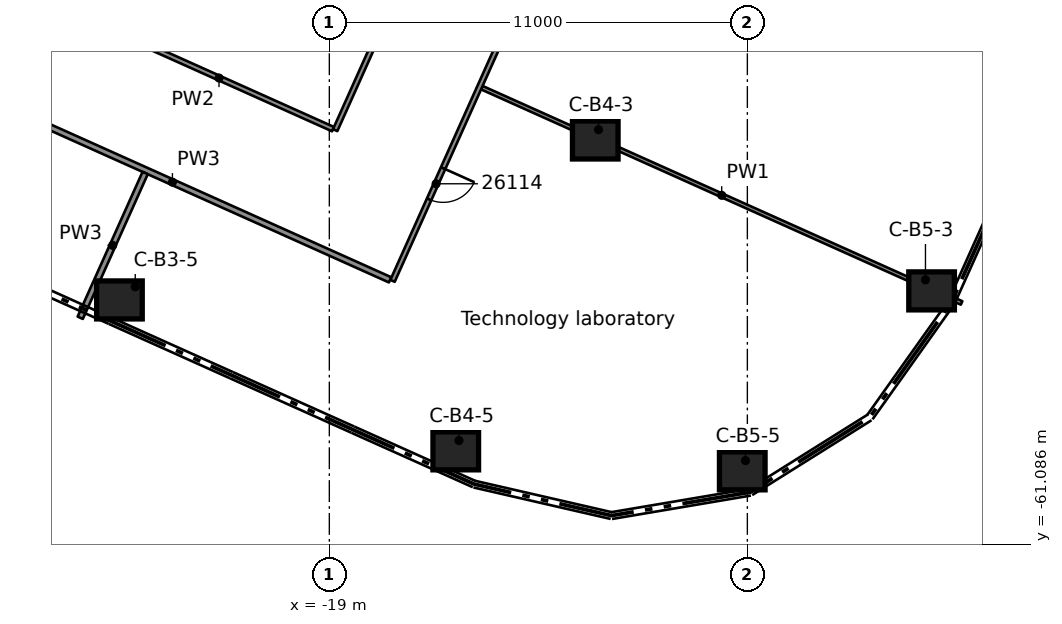
"""IFC4 building model, lengths in metres.
Left out: names, types, materials, properties, quantities, classifications, styles, units other than length and angle.
Written with IfcOpenShell. Run it as: python <this file> out.ifc"""

import sys

from ifc_helpers import new_model, si_unit, direction, frame, frame_2d, origin, origin_2d, place, context, subcontext, project, spatial, rectangle, extrude, element, fill, save


model = new_model("IFC4")
c1 = context("Model", 3, precision=1e-05, world=origin(), true_north=direction((0.0, 1.0)))
c2 = subcontext(c1, "Body", "Model", "MODEL_VIEW")
j1 = project(units=[si_unit("LENGTHUNIT", "METRE"), si_unit("PLANEANGLEUNIT", "RADIAN")], contexts=[c1])
p1 = place(None, origin())
s1 = spatial("IfcSite", under=j1, at=p1, CompositionType="ELEMENT")
p2 = place(p1, origin())
s2 = spatial("IfcBuilding", under=s1, at=p2, CompositionType="ELEMENT")
p3 = place(p2, frame((0.0, 0.0, 134.2)))
s3 = spatial("IfcBuildingStorey", under=s2, at=p3, CompositionType="ELEMENT", Elevation=134.2)
for number, where, z_axis, x_axis in (
    (1, (-24.523, -54.65, 0.0), (0.0, 0.0, 1.0), (1.0, 0.0, 0.0)),
    (2, (-12.002, -50.441, 0.0), (0.0, 0.0, 1.0), (1.0, 0.0, 0.0)),
    (3, (-15.673, -58.621, 0.0), (0.0, 0.0, 1.0), (1.0, 0.0, 0.0)),
    (4, (-3.152, -54.412, 0.0), (0.0, 0.0, 1.0), (1.0, 0.0, 0.0)),
    (5, (-8.134, -59.147, 0.0), (0.0, 0.0, 1.0), (1.0, 0.0, 0.0)),
):
    element("IfcColumn", number, at=place(p3, frame(where, z_axis=z_axis, x_axis=x_axis)), inside=s3, PredefinedType="COLUMN", context=c2, shape_type="SweptSolid", body=[
        extrude(rectangle(XDim=1.2, YDim=1.0, at=origin_2d()), origin(), (0.0, 0.0, 1.0), 3.5),
    ])
p4 = place(p3, frame((-17.401, -54.121, 0.0), z_axis=(0.0, 0.0, 1.0), x_axis=(-0.912370625887, 0.409365168302, 0.0)))
e6 = element("IfcWall", 6, at=p4, inside=s3, PredefinedType="PARTITIONING", context=c2, shape_type="SweptSolid", body=[
    extrude(rectangle(XDim=12.556, YDim=0.15, at=frame_2d((6.278, 0.0))), origin(), (0.0, 0.0, 1.0), 3.03),
])
p5 = place(p3, frame((-24.903, -47.465, 0.0), z_axis=(0.0, 0.0, 1.0), x_axis=(0.912437629311, -0.409215802013, 0.0)))
e7 = element("IfcWall", 7, at=p5, inside=s3, PredefinedType="PARTITIONING", context=c2, shape_type="SweptSolid", body=[
    extrude(rectangle(XDim=6.576, YDim=0.125, at=frame_2d((3.288, 0.0))), origin(), (0.0, 0.0, 1.0), 3.03),
])
p6 = place(p3, frame((-14.987, -49.065, 0.0), z_axis=(0.0, 0.0, 1.0), x_axis=(0.912373916734, -0.409357833763, 0.0)))
e8 = element("IfcWall", 8, at=p6, inside=s3, PredefinedType="PARTITIONING", context=c2, shape_type="SweptSolid", body=[
    extrude(rectangle(XDim=13.836, YDim=0.1, at=frame_2d((6.918, 0.0))), origin(), (0.0, 0.0, 1.0), 3.03),
])
p7 = place(p3, frame((-7.052, -31.233, 0.0), z_axis=(0.0, 0.0, 1.0), x_axis=(-0.409475332718, -0.912321188998, 0.0)))
e9 = element("IfcWall", 9, at=p7, inside=s3, PredefinedType="PARTITIONING", context=c2, shape_type="SweptSolid", body=[
    extrude(rectangle(XDim=25.117, YDim=0.125, at=frame_2d((12.559, 0.0))), origin(), (0.0, 0.0, 1.0), 3.03),
])
p8 = place(p7, frame((4.91, 0.0, 0.0)))
e10 = element("IfcOpeningElement", 10, at=p8, cuts=e9, PredefinedType="OPENING", context=c2, shape_type="SweptSolid", body=[
    extrude(rectangle(XDim=0.9, YDim=2.1, at=frame_2d((0.45, 1.05))), frame((0.0, 0.073, 0.0), z_axis=(0.0, -1.0, 0.0), x_axis=(1.0, 0.0, 0.0)), (0.0, 0.0, 1.0), 0.145),
])
p9 = place(p7, frame((14.217, 0.0, 0.0)))
e11 = element("IfcOpeningElement", 11, at=p9, cuts=e9, PredefinedType="OPENING", context=c2, shape_type="SweptSolid", body=[
    extrude(rectangle(XDim=1.8, YDim=2.1, at=frame_2d((0.9, 1.05))), frame((0.0, 0.073, 0.0), z_axis=(0.0, -1.0, 0.0), x_axis=(1.0, 0.0, 0.0)), (0.0, 0.0, 1.0), 0.145),
])
p10 = place(p7, frame((21.867, 0.0, 0.0)))
e12 = element("IfcOpeningElement", 12, at=p10, cuts=e9, PredefinedType="OPENING", context=c2, shape_type="SweptSolid", body=[
    extrude(rectangle(XDim=0.9, YDim=2.1, at=frame_2d((0.45, 1.05))), frame((0.0, 0.073, 0.0), z_axis=(0.0, -1.0, 0.0), x_axis=(1.0, 0.0, 0.0)), (0.0, 0.0, 1.0), 0.145),
])
p11 = place(p3, frame((-18.846, -50.182, 0.0), z_axis=(0.0, 0.0, 1.0), x_axis=(0.409280065355, 0.912408805363, 0.0)))
e13 = element("IfcWall", 13, at=p11, inside=s3, PredefinedType="PARTITIONING", context=c2, shape_type="SweptSolid", body=[
    extrude(rectangle(XDim=21.42, YDim=0.125, at=frame_2d((10.71, 0.0))), origin(), (0.0, 0.0, 1.0), 3.03),
])
p12 = place(p11, frame((16.1, 0.0, 0.0)))
e14 = element("IfcOpeningElement", 14, at=p12, cuts=e13, PredefinedType="OPENING", context=c2, shape_type="SweptSolid", body=[
    extrude(rectangle(XDim=0.9, YDim=2.1, at=frame_2d((0.45, 1.05))), frame((0.0, 0.073, 0.0), z_axis=(0.0, -1.0, 0.0), x_axis=(1.0, 0.0, 0.0)), (0.0, 0.0, 1.0), 0.145),
])
p13 = place(p11, frame((6.7, 0.0, 0.0)))
e15 = element("IfcOpeningElement", 15, at=p13, cuts=e13, PredefinedType="OPENING", context=c2, shape_type="SweptSolid", body=[
    extrude(rectangle(XDim=0.9, YDim=2.1, at=frame_2d((0.45, 1.05))), frame((0.0, 0.073, 0.0), z_axis=(0.0, -1.0, 0.0), x_axis=(1.0, 0.0, 0.0)), (0.0, 0.0, 1.0), 0.145),
])
p14 = place(p3, frame((-25.555, -55.119, 0.0), z_axis=(0.0, 0.0, 1.0), x_axis=(0.409369884525, 0.912368509783, 0.0)))
e16 = element("IfcWall", 16, at=p14, inside=s3, PredefinedType="PARTITIONING", context=c2, shape_type="SweptSolid", body=[
    extrude(rectangle(XDim=4.175, YDim=0.15, at=frame_2d((2.087, 0.0))), origin(), (0.0, 0.0, 1.0), 3.03),
])
p15 = place(p10, origin())
e17 = element("IfcDoor", 17, at=p15, inside=s3, OperationType="SINGLE_SWING_RIGHT", PredefinedType="DOOR", context=c2, shape_type="SweptSolid", body=[
    extrude(rectangle(XDim=0.9, YDim=2.1, at=frame_2d((0.45, 1.05))), frame((0.0, 0.025, 0.0), z_axis=(0.0, -1.0, 0.0), x_axis=(1.0, 0.0, 0.0)), (0.0, 0.0, 1.0), 0.05),
])
fill(e12, e17)
save(model, sys.argv[1])
